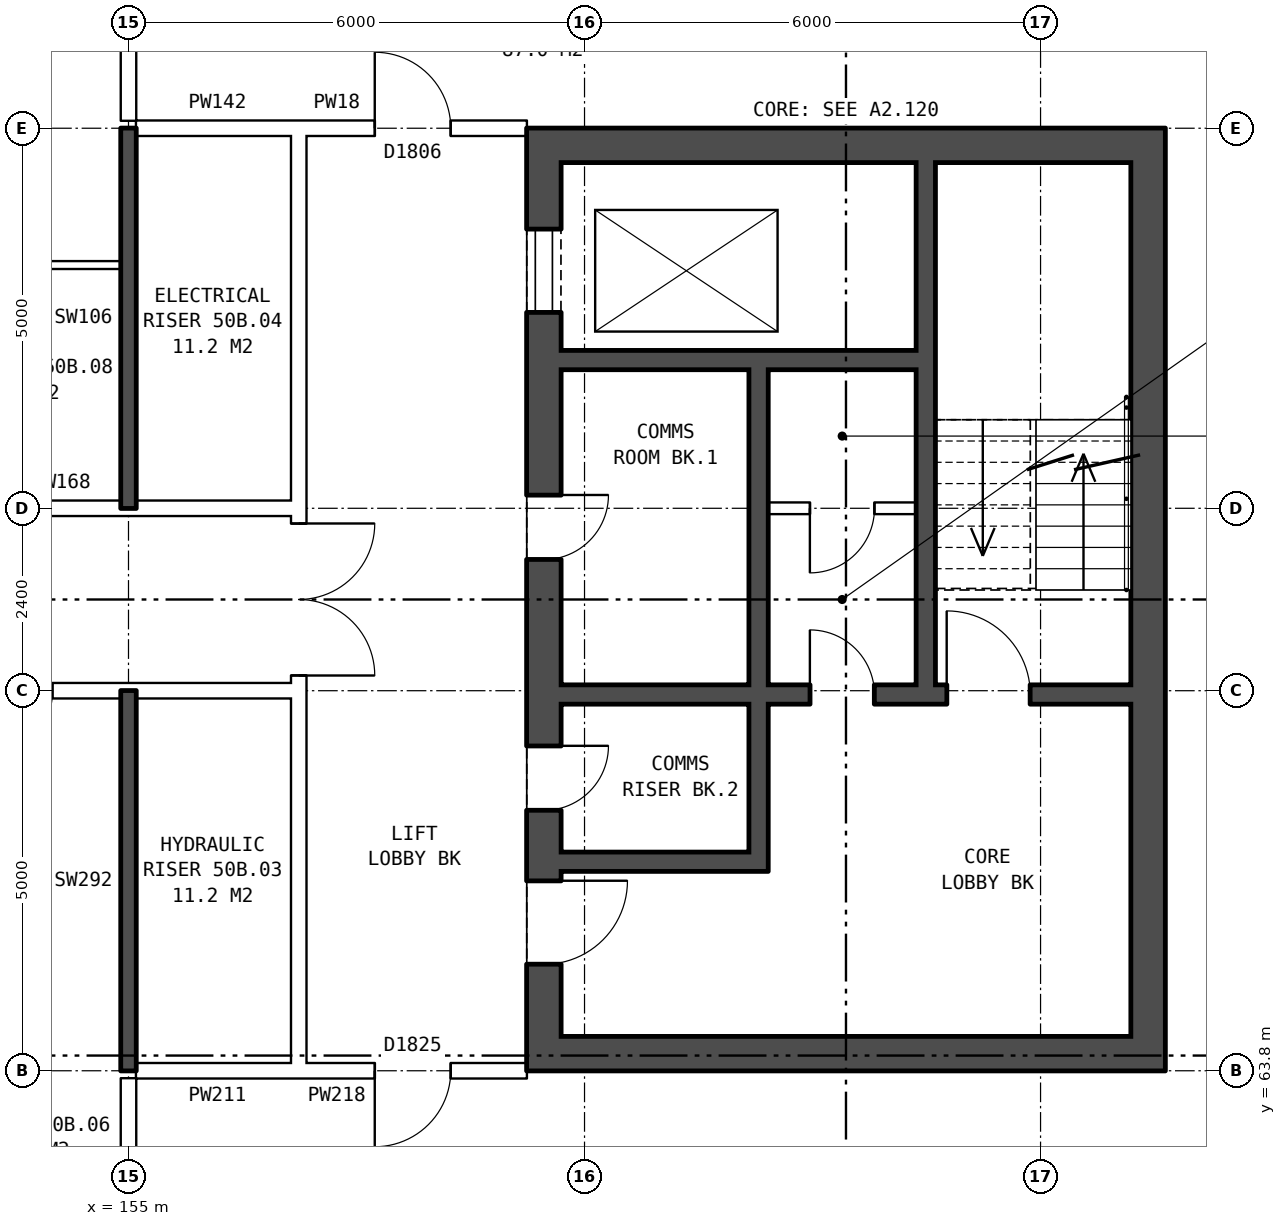
"""IFC4 building model, lengths in metres.
Left out: names, types, materials, properties, quantities, classifications, styles, units other than length and angle.
Written with IfcOpenShell. Run it as: python <this file> out.ifc"""

import sys

from ifc_helpers import new_model, si_unit, direction, frame, frame_2d, origin, place, context, subcontext, project, spatial, rectangle, extrude, element, fill, save


model = new_model("IFC4")
c1 = context("Model", 3, precision=1e-05, world=origin(), true_north=direction((0.0, 1.0)))
c2 = subcontext(c1, "Body", "Model", "MODEL_VIEW")
j1 = project(units=[si_unit("LENGTHUNIT", "METRE"), si_unit("PLANEANGLEUNIT", "RADIAN")], contexts=[c1])
p1 = place(None, origin())
s1 = spatial("IfcSite", under=j1, at=p1, CompositionType="ELEMENT")
p2 = place(p1, origin())
s2 = spatial("IfcBuilding", under=s1, at=p2, CompositionType="ELEMENT")
p3 = place(p2, frame((0.0, 0.0, 178.9)))
s3 = spatial("IfcBuildingStorey", under=s2, at=p3, CompositionType="ELEMENT", Elevation=178.9)
p4 = place(p3, frame((160.465, 76.2, 0.0), z_axis=(0.0, 0.0, 1.0), x_axis=(0.0, -1.0, 0.0)))
e1 = element("IfcWall", 1, at=p4, inside=s3, PredefinedType="SHEAR", context=c2, shape_type="SweptSolid", body=[
    extrude(rectangle(XDim=12.4, YDim=0.45, at=frame_2d((6.2, 0.0))), origin(), (0.0, 0.0, 1.0), 2.85),
])
p5 = place(p4, frame((1.325, 0.0, 0.0)))
e2 = element("IfcOpeningElement", 2, at=p5, cuts=e1, PredefinedType="OPENING", context=c2, shape_type="SweptSolid", body=[
    extrude(rectangle(XDim=1.1, YDim=2.1, at=frame_2d((0.55, 1.05))), frame((0.0, 0.235, 0.0), z_axis=(0.0, -1.0, 0.0), x_axis=(1.0, 0.0, 0.0)), (0.0, 0.0, 1.0), 0.47),
])
p6 = place(p4, frame((4.825, 0.0, 0.0)))
e3 = element("IfcOpeningElement", 3, at=p6, cuts=e1, PredefinedType="OPENING", context=c2, shape_type="SweptSolid", body=[
    extrude(rectangle(XDim=0.85, YDim=2.1, at=frame_2d((0.425, 1.05))), frame((0.0, 0.235, 0.0), z_axis=(0.0, -1.0, 0.0), x_axis=(1.0, 0.0, 0.0)), (0.0, 0.0, 1.0), 0.47),
])
p7 = place(p4, frame((9.9, 0.0, 0.0)))
e4 = element("IfcOpeningElement", 4, at=p7, cuts=e1, PredefinedType="OPENING", context=c2, shape_type="SweptSolid", body=[
    extrude(rectangle(XDim=1.1, YDim=2.1, at=frame_2d((0.55, 1.05))), frame((0.0, 0.235, 0.0), z_axis=(0.0, -1.0, 0.0), x_axis=(1.0, 0.0, 0.0)), (0.0, 0.0, 1.0), 0.47),
])
p8 = place(p4, frame((8.125, 0.0, 0.0)))
e5 = element("IfcOpeningElement", 5, at=p8, cuts=e1, PredefinedType="OPENING", context=c2, shape_type="SweptSolid", body=[
    extrude(rectangle(XDim=0.85, YDim=2.1, at=frame_2d((0.425, 1.05))), frame((0.0, 0.235, 0.0), z_axis=(0.0, -1.0, 0.0), x_axis=(1.0, 0.0, 0.0)), (0.0, 0.0, 1.0), 0.47),
])
p9 = place(p3, frame((168.415, 76.2, 0.0), z_axis=(0.0, 0.0, 1.0), x_axis=(0.0, -1.0, 0.0)))
e6 = element("IfcWall", 6, at=p9, inside=s3, PredefinedType="SHEAR", context=c2, shape_type="SweptSolid", body=[
    extrude(rectangle(XDim=12.4, YDim=0.45, at=frame_2d((6.2, 0.0))), origin(), (0.0, 0.0, 1.0), 2.85),
])
for number, where, z_axis, x_axis in (
    (7, (160.69, 75.975, 0.0), (0.0, 0.0, 1.0), (1.0, 0.0, 0.0)),
    (8, (160.69, 64.025, 0.0), (0.0, 0.0, 1.0), (1.0, 0.0, 0.0)),
):
    element("IfcWall", number, at=place(p3, frame(where, z_axis=z_axis, x_axis=x_axis)), inside=s3, PredefinedType="SHEAR", context=c2, shape_type="SweptSolid", body=[
        extrude(rectangle(XDim=7.5, YDim=0.45, at=frame_2d((3.75, 0.0))), origin(), (0.0, 0.0, 1.0), 2.85),
    ])
p10 = place(p3, frame((160.69, 73.15, 0.0), z_axis=(0.0, 0.0, 1.0), x_axis=(1.0, 0.0, 0.0)))
e9 = element("IfcWall", 9, at=p10, inside=s3, PredefinedType="SHEAR", context=c2, shape_type="SweptSolid", body=[
    extrude(rectangle(XDim=4.675, YDim=0.25, at=frame_2d((2.337, 0.0))), origin(), (0.0, 0.0, 1.0), 2.85),
])
p11 = place(p3, frame((163.415, 71.2, 0.0), z_axis=(0.0, 0.0, 1.0), x_axis=(1.0, 0.0, 0.0)))
e10 = element("IfcWall", 10, at=p11, inside=s3, PredefinedType="PARTITIONING", context=c2, shape_type="SweptSolid", body=[
    extrude(rectangle(XDim=1.95, YDim=0.15, at=frame_2d((0.975, 0.0))), origin(), (0.0, 0.0, 1.0), 2.85),
])
p12 = place(p11, frame((0.55, 0.0, 0.0)))
e11 = element("IfcOpeningElement", 11, at=p12, cuts=e10, PredefinedType="OPENING", context=c2, shape_type="SweptSolid", body=[
    extrude(rectangle(XDim=0.85, YDim=2.1, at=frame_2d((0.425, 1.05))), frame((0.0, 0.085, 0.0), z_axis=(0.0, -1.0, 0.0), x_axis=(1.0, 0.0, 0.0)), (0.0, 0.0, 1.0), 0.17),
])
p13 = place(p3, frame((160.69, 68.75, 0.0), z_axis=(0.0, 0.0, 1.0), x_axis=(1.0, 0.0, 0.0)))
e12 = element("IfcWall", 12, at=p13, inside=s3, PredefinedType="SHEAR", context=c2, shape_type="SweptSolid", body=[
    extrude(rectangle(XDim=7.5, YDim=0.25, at=frame_2d((3.75, 0.0))), origin(), (0.0, 0.0, 1.0), 2.85),
])
p14 = place(p13, frame((5.075, 0.0, 0.0)))
e13 = element("IfcOpeningElement", 13, at=p14, cuts=e12, PredefinedType="OPENING", context=c2, shape_type="SweptSolid", body=[
    extrude(rectangle(XDim=1.1, YDim=2.1, at=frame_2d((0.55, 1.05))), frame((0.0, 0.135, 0.0), z_axis=(0.0, -1.0, 0.0), x_axis=(1.0, 0.0, 0.0)), (0.0, 0.0, 1.0), 0.27),
])
p15 = place(p13, frame((3.275, 0.0, 0.0)))
e14 = element("IfcOpeningElement", 14, at=p15, cuts=e12, PredefinedType="OPENING", context=c2, shape_type="SweptSolid", body=[
    extrude(rectangle(XDim=0.85, YDim=2.1, at=frame_2d((0.425, 1.05))), frame((0.0, 0.135, 0.0), z_axis=(0.0, -1.0, 0.0), x_axis=(1.0, 0.0, 0.0)), (0.0, 0.0, 1.0), 0.27),
])
p16 = place(p3, frame((160.69, 66.55, 0.0), z_axis=(0.0, 0.0, 1.0), x_axis=(1.0, 0.0, 0.0)))
e15 = element("IfcWall", 15, at=p16, inside=s3, PredefinedType="SHEAR", context=c2, shape_type="SweptSolid", body=[
    extrude(rectangle(XDim=2.475, YDim=0.25, at=frame_2d((1.238, 0.0))), origin(), (0.0, 0.0, 1.0), 2.85),
])
p17 = place(p3, frame((163.29, 73.025, 0.0), z_axis=(0.0, 0.0, 1.0), x_axis=(0.0, -1.0, 0.0)))
e16 = element("IfcWall", 16, at=p17, inside=s3, PredefinedType="SHEAR", context=c2, shape_type="SweptSolid", body=[
    extrude(rectangle(XDim=4.15, YDim=0.25, at=frame_2d((2.075, 0.0))), origin(), (0.0, 0.0, 1.0), 2.85),
])
p18 = place(p3, frame((163.29, 68.625, 0.0), z_axis=(0.0, 0.0, 1.0), x_axis=(0.0, -1.0, 0.0)))
e17 = element("IfcWall", 17, at=p18, inside=s3, PredefinedType="SHEAR", context=c2, shape_type="SweptSolid", body=[
    extrude(rectangle(XDim=2.2, YDim=0.25, at=frame_2d((1.1, 0.0))), origin(), (0.0, 0.0, 1.0), 2.85),
])
p19 = place(p3, frame((165.49, 75.75, 0.0), z_axis=(0.0, 0.0, 1.0), x_axis=(0.0, -1.0, 0.0)))
e18 = element("IfcWall", 18, at=p19, inside=s3, PredefinedType="SHEAR", context=c2, shape_type="SweptSolid", body=[
    extrude(rectangle(XDim=6.875, YDim=0.25, at=frame_2d((3.438, 0.0))), origin(), (0.0, 0.0, 1.0), 2.85),
])
p20 = place(p3, frame((157.24, 63.9, 0.0), z_axis=(0.0, 0.0, 1.0), x_axis=(0.0, 1.0, 0.0)))
e19 = element("IfcWall", 19, at=p20, inside=s3, PredefinedType="PARTITIONING", context=c2, shape_type="SweptSolid", body=[
    extrude(rectangle(XDim=12.2, YDim=0.2, at=frame_2d((6.1, 0.0))), origin(), (0.0, 0.0, 1.0), 2.85),
])
p21 = place(p20, frame((5.1, 0.0, 0.0)))
e20 = element("IfcOpeningElement", 20, at=p21, cuts=e19, PredefinedType="OPENING", context=c2, shape_type="SweptSolid", body=[
    extrude(rectangle(XDim=2.0, YDim=2.1, at=frame_2d((1.0, 1.05))), frame((0.0, 0.11, 0.0), z_axis=(0.0, -1.0, 0.0), x_axis=(1.0, 0.0, 0.0)), (0.0, 0.0, 1.0), 0.22),
])
p22 = place(p3, frame((155.1, 63.8, 0.0), z_axis=(0.0, 0.0, 1.0), x_axis=(1.0, 0.0, 0.0)))
e21 = element("IfcWall", 21, at=p22, inside=s3, PredefinedType="PARTITIONING", context=c2, shape_type="SweptSolid", body=[
    extrude(rectangle(XDim=2.14, YDim=0.2, at=frame_2d((1.07, 0.0))), origin(), (0.0, 0.0, 1.0), 2.85),
])
p23 = place(p3, frame((157.24, 63.8, 0.0), z_axis=(0.0, 0.0, 1.0), x_axis=(1.0, 0.0, 0.0)))
e22 = element("IfcWall", 22, at=p23, inside=s3, PredefinedType="PARTITIONING", context=c2, shape_type="SweptSolid", body=[
    extrude(rectangle(XDim=3.0, YDim=0.2, at=frame_2d((1.5, 0.0))), origin(), (0.0, 0.0, 1.0), 2.85),
])
p24 = place(p23, frame((1.0, 0.0, 0.0)))
e23 = element("IfcOpeningElement", 23, at=p24, cuts=e22, PredefinedType="OPENING", context=c2, shape_type="SweptSolid", body=[
    extrude(rectangle(XDim=1.0, YDim=2.1, at=frame_2d((0.5, 1.05))), frame((0.0, 0.11, 0.0), z_axis=(0.0, -1.0, 0.0), x_axis=(1.0, 0.0, 0.0)), (0.0, 0.0, 1.0), 0.22),
])
p25 = place(p3, frame((142.76, 68.8, 0.0), z_axis=(0.0, 0.0, 1.0), x_axis=(1.0, 0.0, 0.0)))
e24 = element("IfcWall", 24, at=p25, inside=s3, PredefinedType="PARTITIONING", context=c2, shape_type="SweptSolid", body=[
    extrude(rectangle(XDim=14.48, YDim=0.2, at=frame_2d((7.24, 0.0))), origin(), (0.0, 0.0, 1.0), 2.85),
])
p26 = place(p25, frame((1.12, 0.0, 0.0)))
e25 = element("IfcOpeningElement", 25, at=p26, cuts=e24, PredefinedType="OPENING", context=c2, shape_type="SweptSolid", body=[
    extrude(rectangle(XDim=1.0, YDim=2.1, at=frame_2d((0.5, 1.05))), frame((0.0, 0.11, 0.0), z_axis=(0.0, -1.0, 0.0), x_axis=(1.0, 0.0, 0.0)), (0.0, 0.0, 1.0), 0.22),
])
p27 = place(p25, frame((10.24, 0.0, 0.0)))
e26 = element("IfcOpeningElement", 26, at=p27, cuts=e24, PredefinedType="OPENING", context=c2, shape_type="SweptSolid", body=[
    extrude(rectangle(XDim=1.0, YDim=2.1, at=frame_2d((0.5, 1.05))), frame((0.0, 0.11, 0.0), z_axis=(0.0, -1.0, 0.0), x_axis=(1.0, 0.0, 0.0)), (0.0, 0.0, 1.0), 0.22),
])
p28 = place(p3, frame((142.76, 71.2, 0.0), z_axis=(0.0, 0.0, 1.0), x_axis=(1.0, 0.0, 0.0)))
e27 = element("IfcWall", 27, at=p28, inside=s3, PredefinedType="PARTITIONING", context=c2, shape_type="SweptSolid", body=[
    extrude(rectangle(XDim=14.48, YDim=0.2, at=frame_2d((7.24, 0.0))), origin(), (0.0, 0.0, 1.0), 2.85),
])
p29 = place(p28, frame((1.12, 0.0, 0.0)))
e28 = element("IfcOpeningElement", 28, at=p29, cuts=e27, PredefinedType="OPENING", context=c2, shape_type="SweptSolid", body=[
    extrude(rectangle(XDim=1.0, YDim=2.1, at=frame_2d((0.5, 1.05))), frame((0.0, 0.11, 0.0), z_axis=(0.0, -1.0, 0.0), x_axis=(1.0, 0.0, 0.0)), (0.0, 0.0, 1.0), 0.22),
])
p30 = place(p28, frame((7.24, 0.0, 0.0)))
e29 = element("IfcOpeningElement", 29, at=p30, cuts=e27, PredefinedType="OPENING", context=c2, shape_type="SweptSolid", body=[
    extrude(rectangle(XDim=1.0, YDim=2.1, at=frame_2d((0.5, 1.05))), frame((0.0, 0.11, 0.0), z_axis=(0.0, -1.0, 0.0), x_axis=(1.0, 0.0, 0.0)), (0.0, 0.0, 1.0), 0.22),
])
p31 = place(p3, frame((152.0, 74.4, 0.0), z_axis=(0.0, 0.0, 1.0), x_axis=(1.0, 0.0, 0.0)))
e30 = element("IfcWall", 30, at=p31, inside=s3, PredefinedType="PARTITIONING", context=c2, shape_type="SweptSolid", body=[
    extrude(rectangle(XDim=2.9, YDim=0.1, at=frame_2d((1.45, 0.0))), origin(), (0.0, 0.0, 1.0), 2.85),
])
p32 = place(p3, frame((155.1, 76.2, 0.0), z_axis=(0.0, 0.0, 1.0), x_axis=(1.0, 0.0, 0.0)))
e31 = element("IfcWall", 31, at=p32, inside=s3, PredefinedType="PARTITIONING", context=c2, shape_type="SweptSolid", body=[
    extrude(rectangle(XDim=2.14, YDim=0.2, at=frame_2d((1.07, 0.0))), origin(), (0.0, 0.0, 1.0), 2.85),
])
p33 = place(p3, frame((157.24, 76.2, 0.0), z_axis=(0.0, 0.0, 1.0), x_axis=(1.0, 0.0, 0.0)))
e32 = element("IfcWall", 32, at=p33, inside=s3, PredefinedType="PARTITIONING", context=c2, shape_type="SweptSolid", body=[
    extrude(rectangle(XDim=3.0, YDim=0.2, at=frame_2d((1.5, 0.0))), origin(), (0.0, 0.0, 1.0), 2.85),
])
p34 = place(p33, frame((1.0, 0.0, 0.0)))
e33 = element("IfcOpeningElement", 33, at=p34, cuts=e32, PredefinedType="OPENING", context=c2, shape_type="SweptSolid", body=[
    extrude(rectangle(XDim=1.0, YDim=2.1, at=frame_2d((0.5, 1.05))), frame((0.0, 0.11, 0.0), z_axis=(0.0, -1.0, 0.0), x_axis=(1.0, 0.0, 0.0)), (0.0, 0.0, 1.0), 0.22),
])
p35 = place(p3, frame((155.0, 61.5, 0.0), z_axis=(0.0, 0.0, 1.0), x_axis=(0.0, 1.0, 0.0)))
e34 = element("IfcWall", 34, at=p35, inside=s3, PredefinedType="PARTITIONING", context=c2, shape_type="SweptSolid", body=[
    extrude(rectangle(XDim=2.2, YDim=0.2, at=frame_2d((1.1, 0.0))), origin(), (0.0, 0.0, 1.0), 2.85),
])
for number, where, z_axis, x_axis in (
    (35, (155.0, 63.8, 0.0), (0.0, 0.0, 1.0), (0.0, 1.0, 0.0)),
    (36, (155.0, 71.2, 0.0), (0.0, 0.0, 1.0), (0.0, 1.0, 0.0)),
):
    element("IfcWall", number, at=place(p3, frame(where, z_axis=z_axis, x_axis=x_axis)), inside=s3, PredefinedType="SOLIDWALL", context=c2, shape_type="SweptSolid", body=[
        extrude(rectangle(XDim=5.0, YDim=0.2, at=frame_2d((2.5, 0.0))), origin(), (0.0, 0.0, 1.0), 2.85),
    ])
p36 = place(p3, frame((155.0, 76.3, 0.0), z_axis=(0.0, 0.0, 1.0), x_axis=(0.0, 1.0, 0.0)))
e37 = element("IfcWall", 37, at=p36, inside=s3, PredefinedType="PARTITIONING", context=c2, shape_type="SweptSolid", body=[
    extrude(rectangle(XDim=2.2, YDim=0.2, at=frame_2d((1.1, 0.0))), origin(), (0.0, 0.0, 1.0), 2.85),
])
p37 = place(p5, origin())
e38 = element("IfcDoor", 38, at=p37, inside=s3, OperationType="DOUBLE_DOOR_SLIDING", PredefinedType="DOOR", context=c2, shape_type="SweptSolid", body=[
    extrude(rectangle(XDim=1.1, YDim=2.1, at=frame_2d((0.55, 1.05))), frame((0.0, 0.21, 0.0), z_axis=(0.0, -1.0, 0.0), x_axis=(1.0, 0.0, 0.0)), (0.0, 0.0, 1.0), 0.05),
])
fill(e2, e38)
p38 = place(p6, origin())
e39 = element("IfcDoor", 39, at=p38, inside=s3, OperationType="SINGLE_SWING_LEFT", PredefinedType="DOOR", context=c2, shape_type="SweptSolid", body=[
    extrude(rectangle(XDim=0.85, YDim=2.1, at=frame_2d((0.425, 1.05))), frame((0.0, 0.21, 0.0), z_axis=(0.0, -1.0, 0.0), x_axis=(1.0, 0.0, 0.0)), (0.0, 0.0, 1.0), 0.05),
])
fill(e3, e39)
p39 = place(p7, origin())
e40 = element("IfcDoor", 40, at=p39, inside=s3, OperationType="SINGLE_SWING_LEFT", PredefinedType="DOOR", context=c2, shape_type="SweptSolid", body=[
    extrude(rectangle(XDim=1.1, YDim=2.1, at=frame_2d((0.55, 1.05))), frame((0.0, 0.21, 0.0), z_axis=(0.0, -1.0, 0.0), x_axis=(1.0, 0.0, 0.0)), (0.0, 0.0, 1.0), 0.05),
])
fill(e4, e40)
p40 = place(p14, origin())
e41 = element("IfcDoor", 41, at=p40, inside=s3, OperationType="SINGLE_SWING_LEFT", PredefinedType="DOOR", context=c2, shape_type="SweptSolid", body=[
    extrude(rectangle(XDim=1.1, YDim=2.1, at=frame_2d((0.55, 1.05))), frame((0.0, 0.025, 0.0), z_axis=(0.0, -1.0, 0.0), x_axis=(1.0, 0.0, 0.0)), (0.0, 0.0, 1.0), 0.05),
])
fill(e13, e41)
p41 = place(p8, origin())
e42 = element("IfcDoor", 42, at=p41, inside=s3, OperationType="SINGLE_SWING_LEFT", PredefinedType="DOOR", context=c2, shape_type="SweptSolid", body=[
    extrude(rectangle(XDim=0.85, YDim=2.1, at=frame_2d((0.425, 1.05))), frame((0.0, 0.21, 0.0), z_axis=(0.0, -1.0, 0.0), x_axis=(1.0, 0.0, 0.0)), (0.0, 0.0, 1.0), 0.05),
])
fill(e5, e42)
p42 = place(p15, origin())
e43 = element("IfcDoor", 43, at=p42, inside=s3, OperationType="SINGLE_SWING_LEFT", PredefinedType="DOOR", context=c2, shape_type="SweptSolid", body=[
    extrude(rectangle(XDim=0.85, YDim=2.1, at=frame_2d((0.425, 1.05))), frame((0.0, 0.025, 0.0), z_axis=(0.0, -1.0, 0.0), x_axis=(1.0, 0.0, 0.0)), (0.0, 0.0, 1.0), 0.05),
])
fill(e14, e43)
p43 = place(p12, frame((0.85, 0.0, 0.0), z_axis=(0.0, 0.0, 1.0), x_axis=(-1.0, 0.0, 0.0)))
e44 = element("IfcDoor", 44, at=p43, inside=s3, OperationType="SINGLE_SWING_RIGHT", PredefinedType="DOOR", context=c2, shape_type="SweptSolid", body=[
    extrude(rectangle(XDim=0.85, YDim=2.1, at=frame_2d((0.425, 1.05))), frame((0.0, 0.025, 0.0), z_axis=(0.0, -1.0, 0.0), x_axis=(1.0, 0.0, 0.0)), (0.0, 0.0, 1.0), 0.05),
])
fill(e11, e44)
p44 = place(p21, frame((2.0, 0.0, 0.0), z_axis=(0.0, 0.0, 1.0), x_axis=(-1.0, 0.0, 0.0)))
e45 = element("IfcDoor", 45, at=p44, inside=s3, OperationType="DOUBLE_DOOR_SINGLE_SWING", PredefinedType="DOOR", context=c2, shape_type="SweptSolid", body=[
    extrude(rectangle(XDim=2.0, YDim=2.1, at=frame_2d((1.0, 1.05))), frame((0.0, 0.025, 0.0), z_axis=(0.0, -1.0, 0.0), x_axis=(1.0, 0.0, 0.0)), (0.0, 0.0, 1.0), 0.05),
])
fill(e20, e45)
p45 = place(p24, frame((1.0, 0.0, 0.0), z_axis=(0.0, 0.0, 1.0), x_axis=(-1.0, 0.0, 0.0)))
e46 = element("IfcDoor", 46, at=p45, inside=s3, OperationType="SINGLE_SWING_RIGHT", PredefinedType="DOOR", context=c2, shape_type="SweptSolid", body=[
    extrude(rectangle(XDim=1.0, YDim=2.1, at=frame_2d((0.5, 1.05))), frame((0.0, 0.025, 0.0), z_axis=(0.0, -1.0, 0.0), x_axis=(1.0, 0.0, 0.0)), (0.0, 0.0, 1.0), 0.05),
])
fill(e23, e46)
p46 = place(p34, origin())
e47 = element("IfcDoor", 47, at=p46, inside=s3, OperationType="SINGLE_SWING_LEFT", PredefinedType="DOOR", context=c2, shape_type="SweptSolid", body=[
    extrude(rectangle(XDim=1.0, YDim=2.1, at=frame_2d((0.5, 1.05))), frame((0.0, 0.025, 0.0), z_axis=(0.0, -1.0, 0.0), x_axis=(1.0, 0.0, 0.0)), (0.0, 0.0, 1.0), 0.05),
])
fill(e33, e47)
save(model, sys.argv[1])
